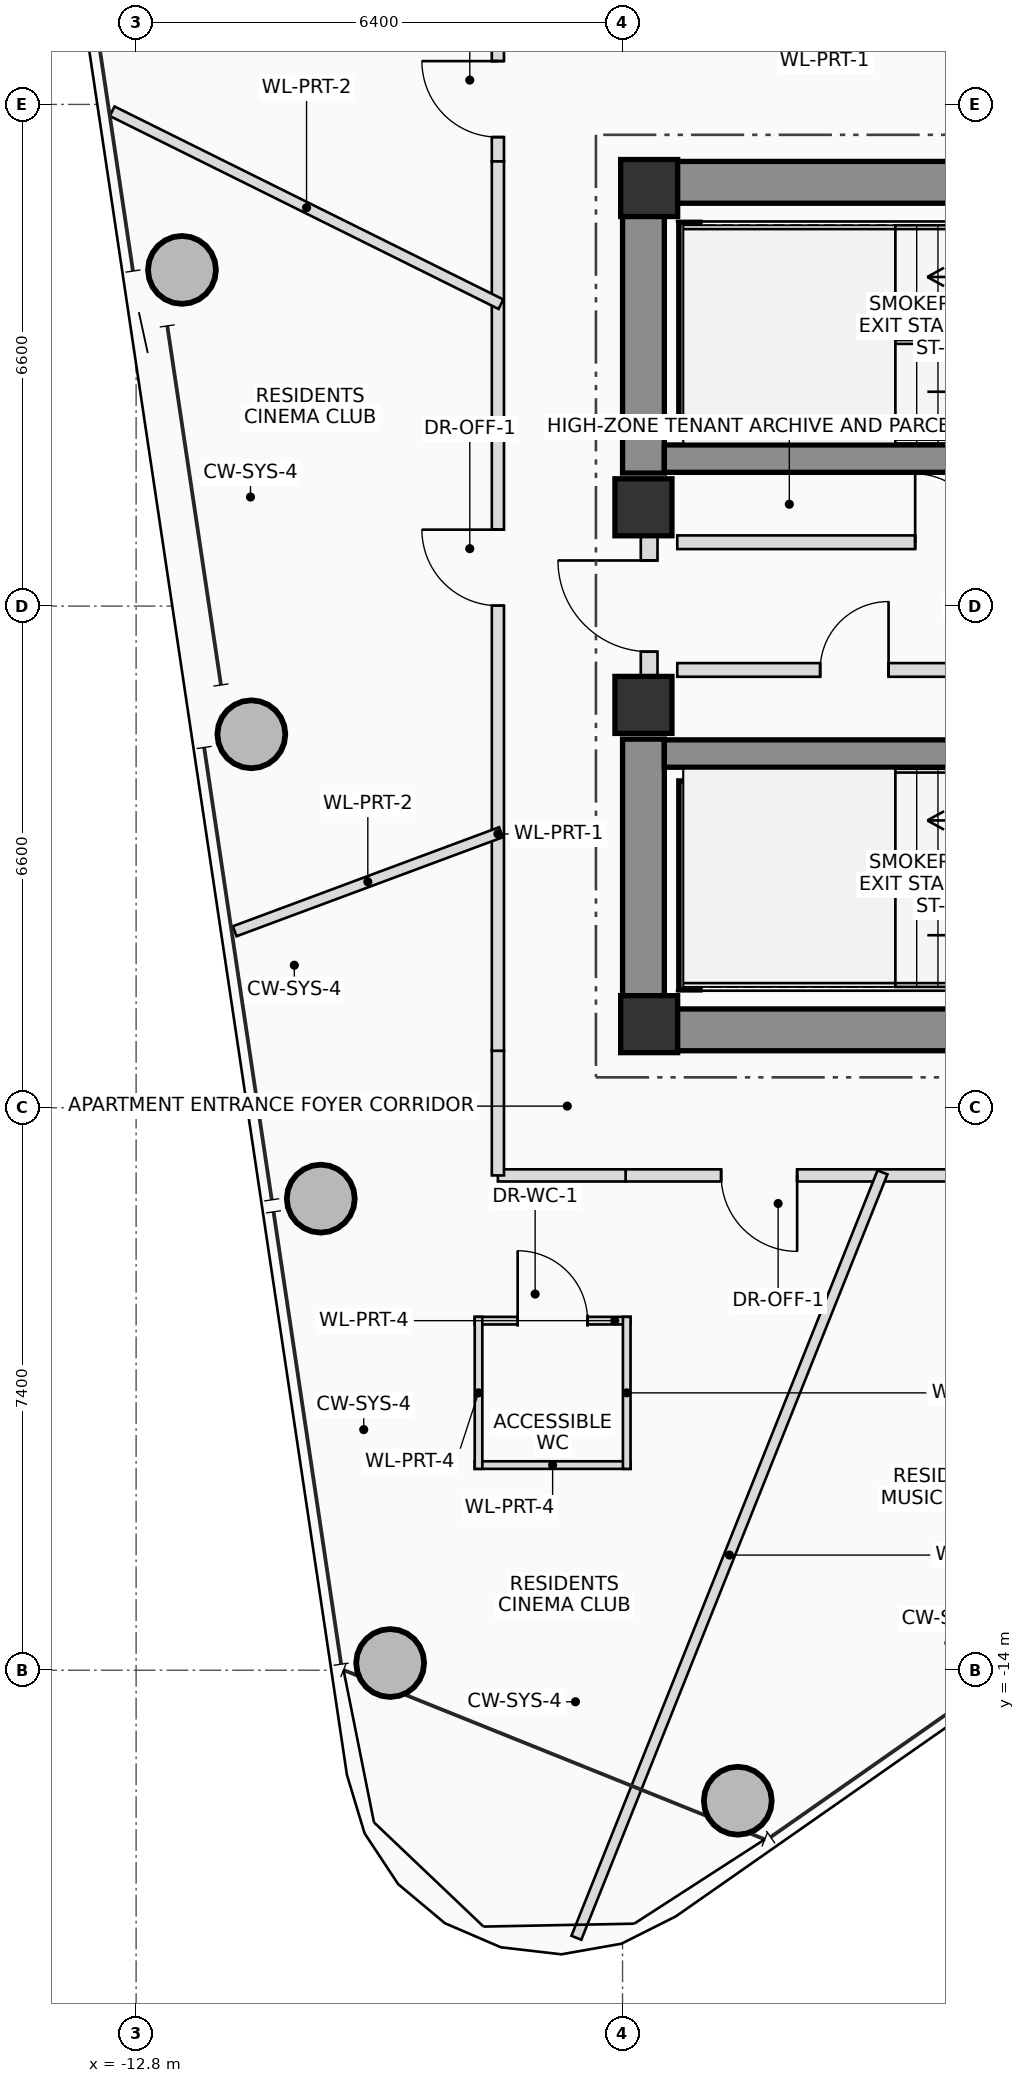
"""IFC4 building model, lengths in metres.
Left out: names, types, materials, properties, quantities, classifications, styles, units other than length and angle.
Written with IfcOpenShell. Run it as: python <this file> out.ifc"""

import sys

from ifc_helpers import new_model, si_unit, direction, frame, frame_2d, origin, origin_2d, place, context, subcontext, project, spatial, rectangle, hollow_circle, extrude, source, transform, mapped, element, fill, save


model = new_model("IFC4")
c1 = context("Model", 3, precision=1e-05, world=origin(), true_north=direction((0.0, 1.0)))
c2 = subcontext(c1, "Body", "Model", "MODEL_VIEW")
j1 = project(units=[si_unit("LENGTHUNIT", "METRE"), si_unit("PLANEANGLEUNIT", "RADIAN")], contexts=[c1])
p1 = place(None, origin())
s1 = spatial("IfcSite", under=j1, at=p1, CompositionType="ELEMENT")
p2 = place(p1, origin())
s2 = spatial("IfcBuilding", under=s1, at=p2, CompositionType="ELEMENT")
p3 = place(p2, frame((0.0, 0.0, 267.75)))
s3 = spatial("IfcBuildingStorey", under=s2, at=p3, CompositionType="ELEMENT", Elevation=267.75)
m1 = source(origin(), c2, "Body", "SweptSolid", [
    extrude(rectangle(XDim=0.75, YDim=0.75, at=origin_2d()), origin(), (0.0, 0.0, 1.0), 3.4),
])
for number, where, z_axis, x_axis in (
    (1, (-6.05, -5.5, 0.0), (0.0, 0.0, 1.0), (1.0, 0.0, 0.0)),
    (2, (-6.05, 5.5, 0.0), (0.0, 0.0, 1.0), (1.0, 0.0, 0.0)),
):
    element("IfcColumn", number, at=place(p3, frame(where, z_axis=z_axis, x_axis=x_axis)), inside=s3, PredefinedType="COLUMN", context=c2, shape_type="MappedRepresentation", body=[
        mapped(m1, transform((0.0, 0.0, 0.0), scale=1.0)),
    ])
p4 = place(p3, frame((-6.4, 5.575, 0.0), z_axis=(0.0, 0.0, 1.0), x_axis=(1.0, 0.0, 0.0)))
e3 = element("IfcWall", 3, at=p4, inside=s3, PredefinedType="SHEAR", context=c2, shape_type="SweptSolid", body=[
    extrude(rectangle(XDim=12.8, YDim=0.55, at=frame_2d((6.4, 0.0))), origin(), (0.0, 0.0, 1.0), 3.4),
])
p5 = place(p4, frame((8.6, 0.0, 0.0)))
e4 = element("IfcOpeningElement", 4, at=p5, cuts=e3, PredefinedType="OPENING", context=c2, shape_type="SweptSolid", body=[
    extrude(rectangle(XDim=1.2, YDim=2.2, at=frame_2d((0.6, 1.1))), frame((0.0, 0.285, 0.0), z_axis=(0.0, -1.0, 0.0), x_axis=(1.0, 0.0, 0.0)), (0.0, 0.0, 1.0), 0.57),
])
p6 = place(p3, frame((-6.4, -5.575, 0.0), z_axis=(0.0, 0.0, 1.0), x_axis=(1.0, 0.0, 0.0)))
e5 = element("IfcWall", 5, at=p6, inside=s3, PredefinedType="SHEAR", context=c2, shape_type="SweptSolid", body=[
    extrude(rectangle(XDim=12.8, YDim=0.55, at=frame_2d((6.4, 0.0))), origin(), (0.0, 0.0, 1.0), 3.4),
])
p7 = place(p6, frame((8.6, 0.0, 0.0)))
e6 = element("IfcOpeningElement", 6, at=p7, cuts=e5, PredefinedType="OPENING", context=c2, shape_type="SweptSolid", body=[
    extrude(rectangle(XDim=1.2, YDim=2.2, at=frame_2d((0.6, 1.1))), frame((0.0, 0.285, 0.0), z_axis=(0.0, -1.0, 0.0), x_axis=(1.0, 0.0, 0.0)), (0.0, 0.0, 1.0), 0.57),
])
for number, where, z_axis, x_axis in (
    (7, (-6.125, -5.3, 0.0), (0.0, 0.0, 1.0), (0.0, 1.0, 0.0)),
    (8, (-6.125, 1.75, 0.0), (0.0, 0.0, 1.0), (0.0, 1.0, 0.0)),
):
    element("IfcWall", number, at=place(p3, frame(where, z_axis=z_axis, x_axis=x_axis)), inside=s3, PredefinedType="SHEAR", context=c2, shape_type="SweptSolid", body=[
        extrude(rectangle(XDim=3.55, YDim=0.55, at=frame_2d((1.775, 0.0))), origin(), (0.0, 0.0, 1.0), 3.4),
    ])
for number, where, z_axis, x_axis in (
    (9, (-5.85, 1.94, 0.0), (0.0, 0.0, 1.0), (1.0, 0.0, 0.0)),
    (10, (-5.85, -1.94, 0.0), (0.0, 0.0, 1.0), (1.0, 0.0, 0.0)),
):
    element("IfcWall", number, at=place(p3, frame(where, z_axis=z_axis, x_axis=x_axis)), inside=s3, PredefinedType="SHEAR", context=c2, shape_type="SweptSolid", body=[
        extrude(rectangle(XDim=11.7, YDim=0.36, at=frame_2d((5.85, 0.0))), origin(), (0.0, 0.0, 1.0), 3.4),
    ])
for number, where, z_axis, x_axis in (
    (11, (-5.52, 2.3, 0.0), (0.0, 0.0, 1.0), (0.0, 1.0, 0.0)),
    (12, (-5.52, -5.05, 0.0), (0.0, 0.0, 1.0), (0.0, 1.0, 0.0)),
):
    element("IfcWall", number, at=place(p3, frame(where, z_axis=z_axis, x_axis=x_axis)), inside=s3, PredefinedType="SHEAR", context=c2, shape_type="SweptSolid", body=[
        extrude(rectangle(XDim=2.75, YDim=0.28, at=frame_2d((1.375, 0.0))), origin(), (0.0, 0.0, 1.0), 3.4),
    ])
for number, where, z_axis, x_axis in (
    (13, (-6.125, -1.3, 0.0), (0.0, 0.0, 1.0), (1.0, 0.0, 0.0)),
    (14, (-6.125, 1.3, 0.0), (0.0, 0.0, 1.0), (1.0, 0.0, 0.0)),
):
    element("IfcColumn", number, at=place(p3, frame(where, z_axis=z_axis, x_axis=x_axis)), inside=s3, PredefinedType="COLUMN", context=c2, shape_type="MappedRepresentation", body=[
        mapped(m1, transform((0.0, 0.0, 0.0), scale=1.0)),
    ])
m2 = source(origin(), c2, "Body", "SweptSolid", [
    extrude(hollow_circle(Radius=0.45, WallThickness=0.032, at=origin_2d()), origin(), (0.0, 0.0, 1.0), 3.4),
])
for number, where, z_axis, x_axis in (
    (15, (-4.884, -15.717, 0.0), (0.0, 0.0, 1.0), (1.0, 0.0, 0.0)),
    (16, (-12.197, 4.423, 0.0), (0.0, 0.0, 1.0), (1.0, 0.0, 0.0)),
    (17, (-11.284, -1.686, 0.0), (0.0, 0.0, 1.0), (1.0, 0.0, 0.0)),
    (18, (-10.371, -7.796, 0.0), (0.0, 0.0, 1.0), (1.0, 0.0, 0.0)),
    (19, (-9.458, -13.905, 0.0), (0.0, 0.0, 1.0), (1.0, 0.0, 0.0)),
):
    element("IfcColumn", number, at=place(p3, frame(where, z_axis=z_axis, x_axis=x_axis)), inside=s3, PredefinedType="COLUMN", context=c2, shape_type="MappedRepresentation", body=[
        mapped(m2, transform((0.0, 0.0, 0.0), scale=1.0)),
    ])
p8 = place(p3, frame((-6.05, -0.95, 0.0), z_axis=(0.0, 0.0, 1.0), x_axis=(0.0, 1.0, 0.0)))
e20 = element("IfcWall", 20, at=p8, inside=s3, PredefinedType="PLUMBINGWALL", context=c2, shape_type="SweptSolid", body=[
    extrude(rectangle(XDim=1.9, YDim=0.22, at=frame_2d((0.95, 0.0))), origin(), (0.0, 0.0, 1.0), 2.18),
])
p9 = place(p8, frame((0.35, 0.0, 0.0)))
e21 = element("IfcOpeningElement", 21, at=p9, cuts=e20, PredefinedType="OPENING", context=c2, shape_type="SweptSolid", body=[
    extrude(rectangle(XDim=1.2, YDim=2.2, at=frame_2d((0.6, 1.1))), frame((0.0, 0.12, 0.0), z_axis=(0.0, -1.0, 0.0), x_axis=(1.0, 0.0, 0.0)), (0.0, 0.0, 1.0), 0.24),
])
p10 = place(p3, frame((-5.68, 0.84, 0.0), z_axis=(0.0, 0.0, 1.0), x_axis=(1.0, 0.0, 0.0)))
e22 = element("IfcWall", 22, at=p10, inside=s3, PredefinedType="PLUMBINGWALL", context=c2, shape_type="SweptSolid", body=[
    extrude(rectangle(XDim=11.33, YDim=0.18, at=frame_2d((5.665, 0.0))), origin(), (0.0, 0.0, 1.0), 3.2),
])
p11 = place(p10, frame((3.13, 0.0, 0.0)))
e23 = element("IfcOpeningElement", 23, at=p11, cuts=e22, PredefinedType="OPENING", context=c2, shape_type="SweptSolid", body=[
    extrude(rectangle(XDim=0.9, YDim=2.05, at=frame_2d((0.45, 1.025))), frame((0.0, 0.1, 0.0), z_axis=(0.0, -1.0, 0.0), x_axis=(1.0, 0.0, 0.0)), (0.0, 0.0, 1.0), 0.2),
])
p12 = place(p10, frame((7.33, 0.0, 0.0)))
e24 = element("IfcOpeningElement", 24, at=p12, cuts=e22, PredefinedType="OPENING", context=c2, shape_type="SweptSolid", body=[
    extrude(rectangle(XDim=1.1, YDim=2.2, at=frame_2d((0.55, 1.1))), frame((0.0, 0.1, 0.0), z_axis=(0.0, -1.0, 0.0), x_axis=(1.0, 0.0, 0.0)), (0.0, 0.0, 1.0), 0.2),
])
p13 = place(p10, frame((8.83, 0.0, 0.0)))
e25 = element("IfcOpeningElement", 25, at=p13, cuts=e22, PredefinedType="OPENING", context=c2, shape_type="SweptSolid", body=[
    extrude(rectangle(XDim=1.1, YDim=2.2, at=frame_2d((0.55, 1.1))), frame((0.0, 0.1, 0.0), z_axis=(0.0, -1.0, 0.0), x_axis=(1.0, 0.0, 0.0)), (0.0, 0.0, 1.0), 0.2),
])
p14 = place(p3, frame((-5.68, -0.84, 0.0), z_axis=(0.0, 0.0, 1.0), x_axis=(1.0, 0.0, 0.0)))
e26 = element("IfcWall", 26, at=p14, inside=s3, PredefinedType="PLUMBINGWALL", context=c2, shape_type="SweptSolid", body=[
    extrude(rectangle(XDim=10.22, YDim=0.18, at=frame_2d((5.11, 0.0))), origin(), (0.0, 0.0, 1.0), 3.2),
])
p15 = place(p14, frame((1.88, 0.0, 0.0)))
e27 = element("IfcOpeningElement", 27, at=p15, cuts=e26, PredefinedType="OPENING", context=c2, shape_type="SweptSolid", body=[
    extrude(rectangle(XDim=0.9, YDim=2.05, at=frame_2d((0.45, 1.025))), frame((0.0, 0.1, 0.0), z_axis=(0.0, -1.0, 0.0), x_axis=(1.0, 0.0, 0.0)), (0.0, 0.0, 1.0), 0.2),
])
p16 = place(p14, frame((5.35, 0.0, 0.0)))
e28 = element("IfcOpeningElement", 28, at=p16, cuts=e26, PredefinedType="OPENING", context=c2, shape_type="SweptSolid", body=[
    extrude(rectangle(XDim=0.9, YDim=2.05, at=frame_2d((0.45, 1.025))), frame((0.0, 0.1, 0.0), z_axis=(0.0, -1.0, 0.0), x_axis=(1.0, 0.0, 0.0)), (0.0, 0.0, 1.0), 0.2),
])
p17 = place(p14, frame((7.33, 0.0, 0.0)))
e29 = element("IfcOpeningElement", 29, at=p17, cuts=e26, PredefinedType="OPENING", context=c2, shape_type="SweptSolid", body=[
    extrude(rectangle(XDim=1.1, YDim=2.2, at=frame_2d((0.55, 1.1))), frame((0.0, 0.1, 0.0), z_axis=(0.0, -1.0, 0.0), x_axis=(1.0, 0.0, 0.0)), (0.0, 0.0, 1.0), 0.2),
])
p18 = place(p14, frame((9.02, 0.0, 0.0)))
e30 = element("IfcOpeningElement", 30, at=p18, cuts=e26, PredefinedType="OPENING", context=c2, shape_type="SweptSolid", body=[
    extrude(rectangle(XDim=0.9, YDim=2.05, at=frame_2d((0.45, 1.025))), frame((0.0, 0.1, 0.0), z_axis=(0.0, -1.0, 0.0), x_axis=(1.0, 0.0, 0.0)), (0.0, 0.0, 1.0), 0.2),
])
p19 = place(p3, frame((-8.345, -9.401, 0.0), z_axis=(0.0, 0.0, 1.0), x_axis=(1.0, 0.0, 0.0)))
e31 = element("IfcWall", 31, at=p19, inside=s3, PredefinedType="PARTITIONING", context=c2, shape_type="SweptSolid", body=[
    extrude(rectangle(XDim=2.05, YDim=0.1, at=frame_2d((1.025, 0.0))), origin(), (0.0, 0.0, 1.0), 2.605),
])
p20 = place(p19, frame((0.565, 0.0, 0.0)))
e32 = element("IfcOpeningElement", 32, at=p20, cuts=e31, PredefinedType="OPENING", context=c2, shape_type="SweptSolid", body=[
    extrude(rectangle(XDim=0.92, YDim=2.1, at=frame_2d((0.46, 1.05))), frame((0.0, 0.06, 0.0), z_axis=(0.0, -1.0, 0.0), x_axis=(1.0, 0.0, 0.0)), (0.0, 0.0, 1.0), 0.12),
])
p21 = place(p3, frame((-6.295, -11.301, 0.0), z_axis=(0.0, 0.0, 1.0), x_axis=(-1.0, 0.0, 0.0)))
e33 = element("IfcWall", 33, at=p21, inside=s3, PredefinedType="PARTITIONING", context=c2, shape_type="SweptSolid", body=[
    extrude(rectangle(XDim=2.05, YDim=0.1, at=frame_2d((1.025, 0.0))), origin(), (0.0, 0.0, 1.0), 3.2),
])
p22 = place(p3, frame((-6.345, -9.351, 0.0), z_axis=(0.0, 0.0, 1.0), x_axis=(0.0, -1.0, 0.0)))
e34 = element("IfcWall", 34, at=p22, inside=s3, PredefinedType="PARTITIONING", context=c2, shape_type="SweptSolid", body=[
    extrude(rectangle(XDim=2.0, YDim=0.1, at=frame_2d((1.0, 0.0))), origin(), (0.0, 0.0, 1.0), 2.805),
])
p23 = place(p3, frame((-8.295, -11.351, 0.0), z_axis=(0.0, 0.0, 1.0), x_axis=(0.0, 1.0, 0.0)))
e35 = element("IfcWall", 35, at=p23, inside=s3, PredefinedType="PARTITIONING", context=c2, shape_type="SweptSolid", body=[
    extrude(rectangle(XDim=2.0, YDim=0.1, at=frame_2d((1.0, 0.0))), origin(), (0.0, 0.0, 1.0), 2.605),
])
p24 = place(p3, frame((-8.04, 5.85, 0.0), z_axis=(0.0, 0.0, 1.0), x_axis=(0.0, 1.0, 0.0)))
e36 = element("IfcWall", 36, at=p24, inside=s3, PredefinedType="PARTITIONING", context=c2, shape_type="SweptSolid", body=[
    extrude(rectangle(XDim=1.64, YDim=0.16, at=frame_2d((0.82, 0.0))), origin(), (0.0, 0.0, 1.0), 2.605),
])
p25 = place(p24, frame((0.32, 0.0, 0.0)))
e37 = element("IfcOpeningElement", 37, at=p25, cuts=e36, PredefinedType="OPENING", context=c2, shape_type="SweptSolid", body=[
    extrude(rectangle(XDim=1.0, YDim=2.25, at=frame_2d((0.5, 1.125))), frame((0.0, 0.09, 0.0), z_axis=(0.0, -1.0, 0.0), x_axis=(1.0, 0.0, 0.0)), (0.0, 0.0, 1.0), 0.18),
])
p26 = place(p3, frame((3.45, -7.49, 0.0), z_axis=(0.0, 0.0, 1.0), x_axis=(-1.0, 0.0, 0.0)))
e38 = element("IfcWall", 38, at=p26, inside=s3, PredefinedType="PARTITIONING", context=c2, shape_type="SweptSolid", body=[
    extrude(rectangle(XDim=9.81, YDim=0.16, at=frame_2d((4.905, 0.0))), origin(), (0.0, 0.0, 1.0), 2.605),
])
p27 = place(p26, frame((3.795, 0.0, 0.0)))
e39 = element("IfcOpeningElement", 39, at=p27, cuts=e38, PredefinedType="OPENING", context=c2, shape_type="SweptSolid", body=[
    extrude(rectangle(XDim=1.0, YDim=2.25, at=frame_2d((0.5, 1.125))), frame((0.0, 0.09, 0.0), z_axis=(0.0, -1.0, 0.0), x_axis=(1.0, 0.0, 0.0)), (0.0, 0.0, 1.0), 0.18),
])
p28 = place(p26, frame((7.553, 0.0, 0.0)))
e40 = element("IfcOpeningElement", 40, at=p28, cuts=e38, PredefinedType="OPENING", context=c2, shape_type="SweptSolid", body=[
    extrude(rectangle(XDim=1.0, YDim=2.25, at=frame_2d((0.5, 1.125))), frame((0.0, 0.09, 0.0), z_axis=(0.0, -1.0, 0.0), x_axis=(1.0, 0.0, 0.0)), (0.0, 0.0, 1.0), 0.18),
])
p29 = place(p3, frame((-6.36, -7.49, 0.0), z_axis=(0.0, 0.0, 1.0), x_axis=(-1.0, 0.0, 0.0)))
e41 = element("IfcWall", 41, at=p29, inside=s3, PredefinedType="PARTITIONING", context=c2, shape_type="SweptSolid", body=[
    extrude(rectangle(XDim=1.68, YDim=0.16, at=frame_2d((0.84, 0.0))), origin(), (0.0, 0.0, 1.0), 2.605),
])
p30 = place(p3, frame((-8.04, -7.49, 0.0), z_axis=(0.0, 0.0, 1.0), x_axis=(0.0, 1.0, 0.0)))
e42 = element("IfcWall", 42, at=p30, inside=s3, PredefinedType="PARTITIONING", context=c2, shape_type="SweptSolid", body=[
    extrude(rectangle(XDim=1.64, YDim=0.16, at=frame_2d((0.82, 0.0))), origin(), (0.0, 0.0, 1.0), 2.605),
])
p31 = place(p3, frame((-8.04, -5.85, 0.0), z_axis=(0.0, 0.0, 1.0), x_axis=(0.0, 1.0, 0.0)))
e43 = element("IfcWall", 43, at=p31, inside=s3, PredefinedType="PARTITIONING", context=c2, shape_type="SweptSolid", body=[
    extrude(rectangle(XDim=11.7, YDim=0.16, at=frame_2d((5.85, 0.0))), origin(), (0.0, 0.0, 1.0), 2.605),
])
p32 = place(p31, frame((5.855, 0.0, 0.0)))
e44 = element("IfcOpeningElement", 44, at=p32, cuts=e43, PredefinedType="OPENING", context=c2, shape_type="SweptSolid", body=[
    extrude(rectangle(XDim=1.0, YDim=2.25, at=frame_2d((0.5, 1.125))), frame((0.0, 0.09, 0.0), z_axis=(0.0, -1.0, 0.0), x_axis=(1.0, 0.0, 0.0)), (0.0, 0.0, 1.0), 0.18),
])
p33 = place(p3, frame((-8.0, 3.971, 0.0), z_axis=(0.0, 0.0, 1.0), x_axis=(-0.895714476241, 0.444629707793, 0.0)))
e45 = element("IfcWall", 45, at=p33, inside=s3, PredefinedType="PARTITIONING", context=c2, shape_type="SweptSolid", body=[
    extrude(rectangle(XDim=5.711, YDim=0.14, at=frame_2d((2.855, 0.0))), origin(), (0.0, 0.0, 1.0), 2.605),
])
p34 = place(p3, frame((-8.0, -2.975, 0.0), z_axis=(0.0, 0.0, 1.0), x_axis=(-0.937281421119, -0.348573575627, 0.0)))
e46 = element("IfcWall", 46, at=p34, inside=s3, PredefinedType="PARTITIONING", context=c2, shape_type="SweptSolid", body=[
    extrude(rectangle(XDim=3.737, YDim=0.14, at=frame_2d((1.869, 0.0))), origin(), (0.0, 0.0, 1.0), 2.605),
])
p35 = place(p3, frame((-2.98, -7.45, 0.0), z_axis=(0.0, 0.0, 1.0), x_axis=(-0.37136350778, -0.928487557854, 0.0)))
e47 = element("IfcWall", 47, at=p35, inside=s3, PredefinedType="PARTITIONING", context=c2, shape_type="SweptSolid", body=[
    extrude(rectangle(XDim=10.845, YDim=0.14, at=frame_2d((5.423, 0.0))), origin(), (0.0, 0.0, 1.0), 2.605),
])
p36 = place(p9, origin())
e48 = element("IfcDoor", 48, at=p36, inside=s3, OperationType="SINGLE_SWING_RIGHT", PredefinedType="DOOR", context=c2, shape_type="SweptSolid", body=[
    extrude(rectangle(XDim=1.2, YDim=2.2, at=frame_2d((0.6, 1.1))), frame((0.0, 0.025, 0.0), z_axis=(0.0, -1.0, 0.0), x_axis=(1.0, 0.0, 0.0)), (0.0, 0.0, 1.0), 0.05),
])
fill(e21, e48)
p37 = place(p11, origin())
e49 = element("IfcDoor", 49, at=p37, inside=s3, OperationType="SINGLE_SWING_LEFT", PredefinedType="DOOR", context=c2, shape_type="SweptSolid", body=[
    extrude(rectangle(XDim=0.9, YDim=2.05, at=frame_2d((0.45, 1.025))), frame((0.0, 0.025, 0.0), z_axis=(0.0, -1.0, 0.0), x_axis=(1.0, 0.0, 0.0)), (0.0, 0.0, 1.0), 0.05),
])
fill(e23, e49)
p38 = place(p15, origin())
e50 = element("IfcDoor", 50, at=p38, inside=s3, OperationType="SINGLE_SWING_RIGHT", PredefinedType="DOOR", context=c2, shape_type="SweptSolid", body=[
    extrude(rectangle(XDim=0.9, YDim=2.05, at=frame_2d((0.45, 1.025))), frame((0.0, 0.025, 0.0), z_axis=(0.0, -1.0, 0.0), x_axis=(1.0, 0.0, 0.0)), (0.0, 0.0, 1.0), 0.05),
])
fill(e27, e50)
p39 = place(p20, origin())
e51 = element("IfcDoor", 51, at=p39, inside=s3, OperationType="SINGLE_SWING_LEFT", PredefinedType="DOOR", context=c2, shape_type="SweptSolid", body=[
    extrude(rectangle(XDim=0.92, YDim=2.1, at=frame_2d((0.46, 1.05))), frame((0.0, 0.025, 0.0), z_axis=(0.0, -1.0, 0.0), x_axis=(1.0, 0.0, 0.0)), (0.0, 0.0, 1.0), 0.05),
])
fill(e32, e51)
p40 = place(p25, origin())
e52 = element("IfcDoor", 52, at=p40, inside=s3, OperationType="SINGLE_SWING_RIGHT", PredefinedType="DOOR", context=c2, shape_type="SweptSolid", body=[
    extrude(rectangle(XDim=1.0, YDim=2.25, at=frame_2d((0.5, 1.125))), frame((0.0, 0.025, 0.0), z_axis=(0.0, -1.0, 0.0), x_axis=(1.0, 0.0, 0.0)), (0.0, 0.0, 1.0), 0.05),
])
fill(e37, e52)
p41 = place(p28, origin())
e53 = element("IfcDoor", 53, at=p41, inside=s3, OperationType="SINGLE_SWING_LEFT", PredefinedType="DOOR", context=c2, shape_type="SweptSolid", body=[
    extrude(rectangle(XDim=1.0, YDim=2.25, at=frame_2d((0.5, 1.125))), frame((0.0, 0.025, 0.0), z_axis=(0.0, -1.0, 0.0), x_axis=(1.0, 0.0, 0.0)), (0.0, 0.0, 1.0), 0.05),
])
fill(e40, e53)
p42 = place(p32, origin())
e54 = element("IfcDoor", 54, at=p42, inside=s3, OperationType="SINGLE_SWING_RIGHT", PredefinedType="DOOR", context=c2, shape_type="SweptSolid", body=[
    extrude(rectangle(XDim=1.0, YDim=2.25, at=frame_2d((0.5, 1.125))), frame((0.0, 0.025, 0.0), z_axis=(0.0, -1.0, 0.0), x_axis=(1.0, 0.0, 0.0)), (0.0, 0.0, 1.0), 0.05),
])
fill(e44, e54)
save(model, sys.argv[1])
